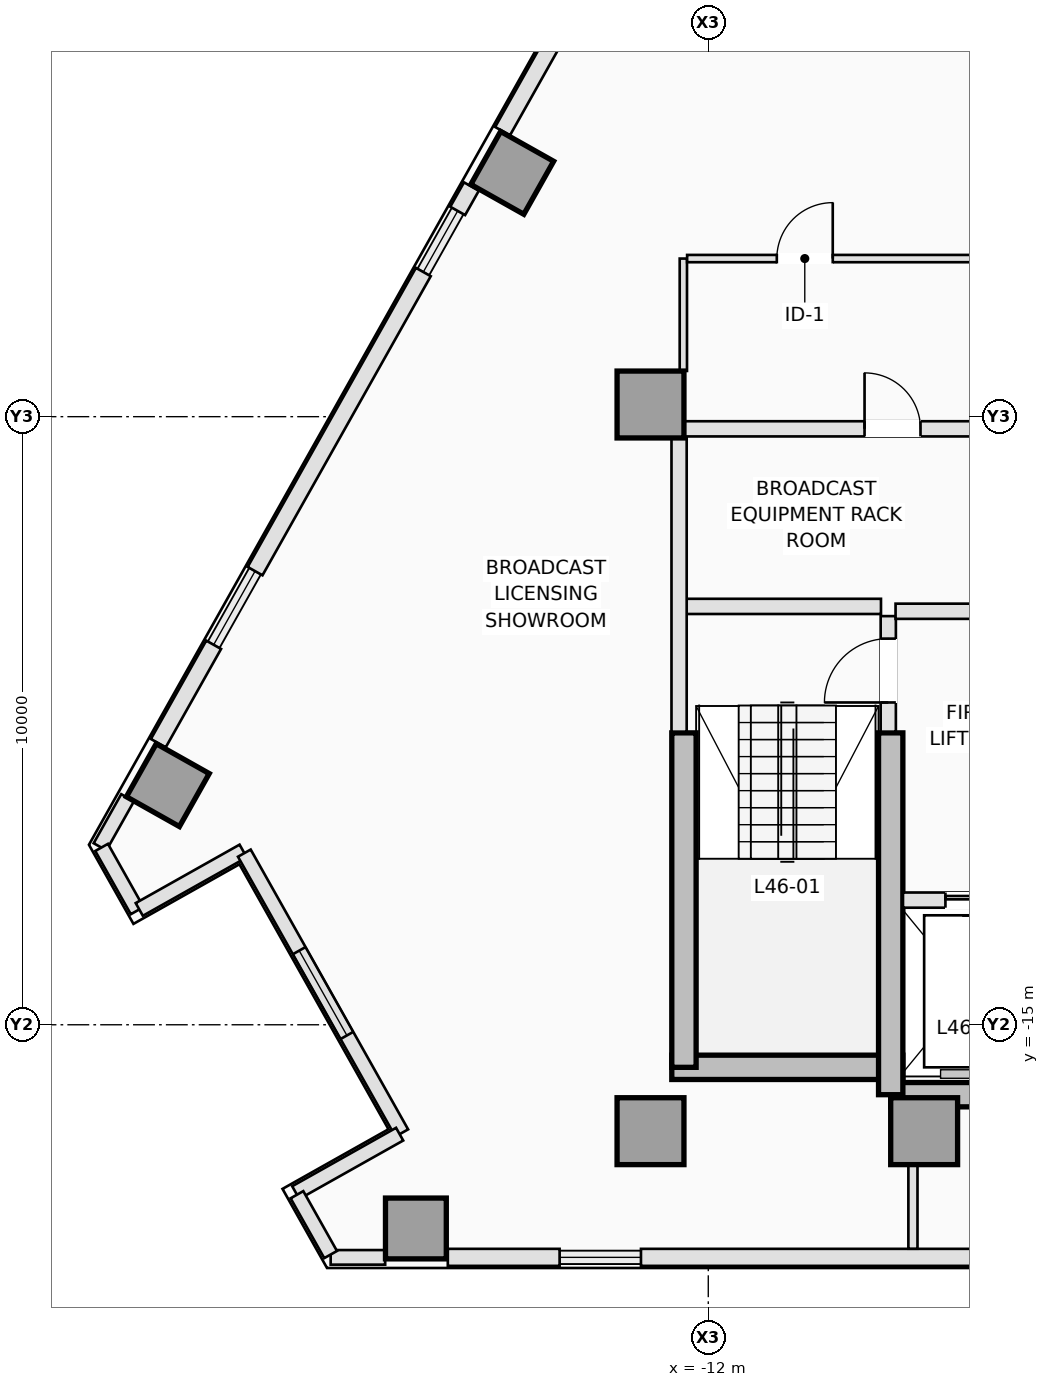
"""IFC4 building model, lengths in metres.
Left out: names, types, materials, properties, quantities, classifications, styles, units other than length and angle.
Written with IfcOpenShell. Run it as: python <this file> out.ifc"""

import sys

from ifc_helpers import new_model, si_unit, direction, frame, frame_2d, origin, origin_2d, place, context, subcontext, project, spatial, rectangle, extrude, element, fill, save


model = new_model("IFC4")
c1 = context("Model", 3, precision=1e-05, world=origin(), true_north=direction((0.0, 1.0)))
c2 = subcontext(c1, "Body", "Model", "MODEL_VIEW")
j1 = project(units=[si_unit("LENGTHUNIT", "METRE"), si_unit("PLANEANGLEUNIT", "RADIAN")], contexts=[c1])
p1 = place(None, origin())
s1 = spatial("IfcSite", under=j1, at=p1, CompositionType="ELEMENT")
p2 = place(p1, origin())
s2 = spatial("IfcBuilding", under=s1, at=p2, CompositionType="ELEMENT")
p3 = place(p2, frame((0.0, 0.0, 168.5)))
s3 = spatial("IfcBuildingStorey", under=s2, at=p3, CompositionType="ELEMENT", Elevation=168.5)
p4 = place(p3, frame((-12.6, -15.7, 0.0), z_axis=(0.0, 0.0, 1.0), x_axis=(1.0, 0.0, 0.0)))
e1 = element("IfcWall", 1, at=p4, inside=s3, PredefinedType="SHEAR", context=c2, shape_type="SweptSolid", body=[
    extrude(rectangle(XDim=3.8, YDim=0.4, at=frame_2d((1.9, 0.0))), origin(), (0.0, 0.0, 1.0), 3.5),
])
p5 = place(p3, frame((-9.0, -16.15, 0.0), z_axis=(0.0, 0.0, 1.0), x_axis=(1.0, 0.0, 0.0)))
e2 = element("IfcWall", 2, at=p5, inside=s3, PredefinedType="SHEAR", context=c2, shape_type="SweptSolid", body=[
    extrude(rectangle(XDim=5.25, YDim=0.4, at=frame_2d((2.625, 0.0))), origin(), (0.0, 0.0, 1.0), 3.5),
])
p6 = place(p3, frame((-12.4, -15.7, 0.0), z_axis=(0.0, 0.0, 1.0), x_axis=(0.0, 1.0, 0.0)))
e3 = element("IfcWall", 3, at=p6, inside=s3, PredefinedType="SHEAR", context=c2, shape_type="SweptSolid", body=[
    extrude(rectangle(XDim=5.5, YDim=0.4, at=frame_2d((2.75, 0.0))), origin(), (0.0, 0.0, 1.0), 3.5),
])
p7 = place(p3, frame((-9.0, -16.15, 0.0), z_axis=(0.0, 0.0, 1.0), x_axis=(0.0, 1.0, 0.0)))
e4 = element("IfcWall", 4, at=p7, inside=s3, PredefinedType="SHEAR", context=c2, shape_type="SweptSolid", body=[
    extrude(rectangle(XDim=5.95, YDim=0.4, at=frame_2d((2.975, 0.0))), origin(), (0.0, 0.0, 1.0), 3.5),
])
for number, where, z_axis, x_axis in (
    (5, (-12.95, -16.75, 0.0), (0.0, 0.0, 1.0), (1.0, 0.0, 0.0)),
    (6, (-8.45, -16.75, 0.0), (0.0, 0.0, 1.0), (1.0, 0.0, 0.0)),
    (7, (-12.95, -4.8, 0.0), (0.0, 0.0, 1.0), (1.0, 0.0, 0.0)),
):
    element("IfcColumn", number, at=place(p3, frame(where, z_axis=z_axis, x_axis=x_axis)), inside=s3, PredefinedType="COLUMN", context=c2, shape_type="SweptSolid", body=[
        extrude(rectangle(XDim=1.1, YDim=1.1, at=origin_2d()), origin(), (0.0, 0.0, 1.0), 3.5),
    ])
for number, where, z_axis, x_axis in (
    (8, (-16.808, -18.35, 0.0), (0.0, 0.0, 1.0), (0.0, 1.0, 0.0)),
    (9, (-15.224, -0.991, 0.0), (0.0, 0.0, 1.0), (-0.872, 0.49, 0.0)),
    (10, (-20.888, -11.06, 0.0), (0.0, 0.0, 1.0), (-0.872, 0.49, 0.0)),
):
    element("IfcColumn", number, at=place(p3, frame(where, z_axis=z_axis, x_axis=x_axis)), inside=s3, PredefinedType="COLUMN", context=c2, shape_type="SweptSolid", body=[
        extrude(rectangle(XDim=1.0, YDim=1.0, at=origin_2d()), origin(), (0.0, 0.0, 1.0), 3.5),
    ])
p8 = place(p3, frame((-17.313, -18.825, 0.0), z_axis=(0.0, 0.0, 1.0), x_axis=(-1.0, 0.0, 0.0)))
e11 = element("IfcWall", 11, at=p8, inside=s3, PredefinedType="STANDARD", context=c2, shape_type="SweptSolid", body=[
    extrude(rectangle(XDim=0.896, YDim=0.24, at=frame_2d((0.448, 0.0))), origin(), (0.0, 0.0, 1.0), 3.25),
])
p9 = place(p3, frame((-7.557, -18.825, 0.0), z_axis=(0.0, 0.0, 1.0), x_axis=(-1.0, 0.0, 0.0)))
e12 = element("IfcWall", 12, at=p9, inside=s3, PredefinedType="STANDARD", context=c2, shape_type="SweptSolid", body=[
    extrude(rectangle(XDim=5.55, YDim=0.28, at=frame_2d((2.775, 0.0))), origin(), (0.0, 0.0, 1.0), 3.25),
])
p10 = place(p3, frame((-14.445, -18.825, 0.0), z_axis=(0.0, 0.0, 1.0), x_axis=(-1.0, 0.0, 0.0)))
e13 = element("IfcWall", 13, at=p10, inside=s3, PredefinedType="STANDARD", context=c2, shape_type="SweptSolid", body=[
    extrude(rectangle(XDim=1.838, YDim=0.28, at=frame_2d((0.919, 0.0))), origin(), (0.0, 0.0, 1.0), 3.25),
])
p11 = place(p3, frame((-22.003, -12.073, 0.0), z_axis=(0.0, 0.0, 1.0), x_axis=(0.490248718924, 0.871582579905, 0.0)))
e14 = element("IfcWall", 14, at=p11, inside=s3, PredefinedType="STANDARD", context=c2, shape_type="SweptSolid", body=[
    extrude(rectangle(XDim=0.926, YDim=0.24, at=frame_2d((0.463, 0.0))), origin(), (0.0, 0.0, 1.0), 3.25),
])
p12 = place(p3, frame((-21.044, -10.369, 0.0), z_axis=(0.0, 0.0, 1.0), x_axis=(0.490248749158, 0.871582562899, 0.0)))
e15 = element("IfcWall", 15, at=p12, inside=s3, PredefinedType="STANDARD", context=c2, shape_type="SweptSolid", body=[
    extrude(rectangle(XDim=1.856, YDim=0.28, at=frame_2d((0.928, 0.0))), origin(), (0.0, 0.0, 1.0), 3.25),
])
p13 = place(p3, frame((-19.453, -7.54, 0.0), z_axis=(0.0, 0.0, 1.0), x_axis=(0.490238645956, 0.871588245682, 0.0)))
e16 = element("IfcWall", 16, at=p13, inside=s3, PredefinedType="STANDARD", context=c2, shape_type="SweptSolid", body=[
    extrude(rectangle(XDim=5.643, YDim=0.28, at=frame_2d((2.822, 0.0))), origin(), (0.0, 0.0, 1.0), 3.25),
])
p14 = place(p3, frame((-16.121, -1.616, 0.0), z_axis=(0.0, 0.0, 1.0), x_axis=(0.490009165718, 0.871717280724, 0.0)))
e17 = element("IfcWall", 17, at=p14, inside=s3, PredefinedType="STANDARD", context=c2, shape_type="SweptSolid", body=[
    extrude(rectangle(XDim=0.46, YDim=0.28, at=frame_2d((0.23, 0.0))), origin(), (0.0, 0.0, 1.0), 3.25),
])
p15 = place(p3, frame((-15.383, -0.305, 0.0), z_axis=(0.0, 0.0, 1.0), x_axis=(0.490232095789, 0.871591929895, 0.0)))
e18 = element("IfcWall", 18, at=p15, inside=s3, PredefinedType="STANDARD", context=c2, shape_type="SweptSolid", body=[
    extrude(rectangle(XDim=4.375, YDim=0.28, at=frame_2d((2.188, 0.0))), origin(), (0.0, 0.0, 1.0), 3.25),
])
p16 = place(p3, frame((-21.977, -12.083, 0.0), z_axis=(0.0, 0.0, 1.0), x_axis=(0.490154352582, -0.871635652463, 0.0)))
e19 = element("IfcWall", 19, at=p16, inside=s3, PredefinedType="STANDARD", context=c2, shape_type="SweptSolid", body=[
    extrude(rectangle(XDim=1.193, YDim=0.24, at=frame_2d((0.596, 0.0))), origin(), (0.0, 0.0, 1.0), 3.25),
])
p17 = place(p3, frame((-21.357, -13.104, 0.0), z_axis=(0.0, 0.0, 1.0), x_axis=(0.871595493845, 0.490225759328, 0.0)))
e20 = element("IfcWall", 20, at=p17, inside=s3, PredefinedType="STANDARD", context=c2, shape_type="SweptSolid", body=[
    extrude(rectangle(XDim=1.96, YDim=0.24, at=frame_2d((0.98, 0.0))), origin(), (0.0, 0.0, 1.0), 3.25),
])
p18 = place(p3, frame((-19.629, -12.177, 0.0), z_axis=(0.0, 0.0, 1.0), x_axis=(0.490276606961, -0.871566892824, 0.0)))
e21 = element("IfcWall", 21, at=p18, inside=s3, PredefinedType="STANDARD", context=c2, shape_type="SweptSolid", body=[
    extrude(rectangle(XDim=5.28, YDim=0.24, at=frame_2d((2.64, 0.0))), origin(), (0.0, 0.0, 1.0), 3.25),
])
p19 = place(p18, frame((1.84, 0.0, 0.9)))
e22 = element("IfcOpeningElement", 22, at=p19, cuts=e21, PredefinedType="OPENING", context=c2, shape_type="SweptSolid", body=[
    extrude(rectangle(XDim=1.6, YDim=2.1, at=frame_2d((0.8, 1.05))), frame((0.0, 0.13, 0.0), z_axis=(0.0, -1.0, 0.0), x_axis=(1.0, 0.0, 0.0)), (0.0, 0.0, 1.0), 0.26),
])
p20 = place(p3, frame((-17.076, -16.799, 0.0), z_axis=(0.0, 0.0, 1.0), x_axis=(-0.871565557139, -0.490278981406, 0.0)))
e23 = element("IfcWall", 23, at=p20, inside=s3, PredefinedType="STANDARD", context=c2, shape_type="SweptSolid", body=[
    extrude(rectangle(XDim=1.96, YDim=0.24, at=frame_2d((0.98, 0.0))), origin(), (0.0, 0.0, 1.0), 3.25),
])
p21 = place(p3, frame((-18.764, -17.795, 0.0), z_axis=(0.0, 0.0, 1.0), x_axis=(0.490353621339, -0.871523565969, 0.0)))
e24 = element("IfcWall", 24, at=p21, inside=s3, PredefinedType="STANDARD", context=c2, shape_type="SweptSolid", body=[
    extrude(rectangle(XDim=1.129, YDim=0.24, at=frame_2d((0.564, 0.0))), origin(), (0.0, 0.0, 1.0), 3.25),
])
p22 = place(p3, frame((-9.04, -10.18, 0.0), z_axis=(0.0, 0.0, 1.0), x_axis=(0.0, 1.0, 0.0)))
e25 = element("IfcWall", 25, at=p22, inside=s3, PredefinedType="PARTITIONING", context=c2, shape_type="SweptSolid", body=[
    extrude(rectangle(XDim=1.9, YDim=0.25, at=frame_2d((0.95, 0.0))), origin(), (0.0, 0.0, 1.0), 3.25),
])
p23 = place(p22, frame((0.48, 0.0, 0.0)))
e26 = element("IfcOpeningElement", 26, at=p23, cuts=e25, PredefinedType="OPENING", context=c2, shape_type="SweptSolid", body=[
    extrude(rectangle(XDim=1.05, YDim=2.15, at=frame_2d((0.525, 1.075))), frame((0.0, 0.135, 0.0), z_axis=(0.0, -1.0, 0.0), x_axis=(1.0, 0.0, 0.0)), (0.0, 0.0, 1.0), 0.27),
])
p24 = place(p3, frame((-12.38, -8.12, 0.0), z_axis=(0.0, 0.0, 1.0), x_axis=(1.0, 0.0, 0.0)))
e27 = element("IfcWall", 27, at=p24, inside=s3, PredefinedType="PARTITIONING", context=c2, shape_type="SweptSolid", body=[
    extrude(rectangle(XDim=3.22, YDim=0.25, at=frame_2d((1.61, 0.0))), origin(), (0.0, 0.0, 1.0), 3.25),
])
p25 = place(p3, frame((-12.48, -10.18, 0.0), z_axis=(0.0, 0.0, 1.0), x_axis=(0.0, 1.0, 0.0)))
e28 = element("IfcWall", 28, at=p25, inside=s3, PredefinedType="PARTITIONING", context=c2, shape_type="SweptSolid", body=[
    extrude(rectangle(XDim=4.828, YDim=0.25, at=frame_2d((2.414, 0.0))), origin(), (0.0, 0.0, 1.0), 3.25),
])
p26 = place(p3, frame((-8.798, -12.95, 0.0), z_axis=(0.0, 0.0, 1.0), x_axis=(1.0, 0.0, 0.0)))
e29 = element("IfcWall", 29, at=p26, inside=s3, PredefinedType="PARTITIONING", context=c2, shape_type="SweptSolid", body=[
    extrude(rectangle(XDim=5.118, YDim=0.25, at=frame_2d((2.559, 0.0))), origin(), (0.0, 0.0, 1.0), 3.25),
])
p27 = place(p26, frame((0.698, 0.0, 0.0)))
e30 = element("IfcOpeningElement", 30, at=p27, cuts=e29, PredefinedType="OPENING", context=c2, shape_type="SweptSolid", body=[
    extrude(rectangle(XDim=1.1, YDim=2.15, at=frame_2d((0.55, 1.075))), frame((0.0, 0.135, 0.0), z_axis=(0.0, -1.0, 0.0), x_axis=(1.0, 0.0, 0.0)), (0.0, 0.0, 1.0), 0.27),
])
p28 = place(p26, frame((2.598, 0.0, 0.0)))
e31 = element("IfcOpeningElement", 31, at=p28, cuts=e29, PredefinedType="OPENING", context=c2, shape_type="SweptSolid", body=[
    extrude(rectangle(XDim=0.88, YDim=2.1, at=frame_2d((0.44, 1.05))), frame((0.0, 0.135, 0.0), z_axis=(0.0, -1.0, 0.0), x_axis=(1.0, 0.0, 0.0)), (0.0, 0.0, 1.0), 0.27),
])
p29 = place(p26, frame((3.998, 0.0, 0.0)))
e32 = element("IfcOpeningElement", 32, at=p29, cuts=e29, PredefinedType="OPENING", context=c2, shape_type="SweptSolid", body=[
    extrude(rectangle(XDim=0.88, YDim=2.1, at=frame_2d((0.44, 1.05))), frame((0.0, 0.135, 0.0), z_axis=(0.0, -1.0, 0.0), x_axis=(1.0, 0.0, 0.0)), (0.0, 0.0, 1.0), 0.27),
])
p30 = place(p3, frame((-8.92, -8.2, 0.0), z_axis=(0.0, 0.0, 1.0), x_axis=(1.0, 0.0, 0.0)))
e33 = element("IfcWall", 33, at=p30, inside=s3, PredefinedType="PARTITIONING", context=c2, shape_type="SweptSolid", body=[
    extrude(rectangle(XDim=5.24, YDim=0.25, at=frame_2d((2.62, 0.0))), origin(), (0.0, 0.0, 1.0), 3.25),
])
p31 = place(p3, frame((-12.398, -5.2, 0.0), z_axis=(0.0, 0.0, 1.0), x_axis=(1.0, 0.0, 0.0)))
e34 = element("IfcWall", 34, at=p31, inside=s3, PredefinedType="PARTITIONING", context=c2, shape_type="SweptSolid", body=[
    extrude(rectangle(XDim=8.096, YDim=0.25, at=frame_2d((4.048, 0.0))), origin(), (0.0, 0.0, 1.0), 3.25),
])
p32 = place(p31, frame((2.968, 0.0, 0.0)))
e35 = element("IfcOpeningElement", 35, at=p32, cuts=e34, PredefinedType="OPENING", context=c2, shape_type="SweptSolid", body=[
    extrude(rectangle(XDim=0.92, YDim=2.12, at=frame_2d((0.46, 1.06))), frame((0.0, 0.135, 0.0), z_axis=(0.0, -1.0, 0.0), x_axis=(1.0, 0.0, 0.0)), (0.0, 0.0, 1.0), 0.27),
])
p33 = place(p31, frame((6.068, 0.0, 0.0)))
e36 = element("IfcOpeningElement", 36, at=p33, cuts=e34, PredefinedType="OPENING", context=c2, shape_type="SweptSolid", body=[
    extrude(rectangle(XDim=0.92, YDim=2.12, at=frame_2d((0.46, 1.06))), frame((0.0, 0.135, 0.0), z_axis=(0.0, -1.0, 0.0), x_axis=(1.0, 0.0, 0.0)), (0.0, 0.0, 1.0), 0.27),
])
p34 = place(p3, frame((-12.41, -4.248, 0.0), z_axis=(0.0, 0.0, 1.0), x_axis=(0.0, 1.0, 0.0)))
e37 = element("IfcWall", 37, at=p34, inside=s3, PredefinedType="PARTITIONING", context=c2, shape_type="SweptSolid", body=[
    extrude(rectangle(XDim=1.848, YDim=0.12, at=frame_2d((0.924, 0.0))), origin(), (0.0, 0.0, 1.0), 3.25),
])
p35 = place(p3, frame((-12.348, -2.4, 0.0), z_axis=(0.0, 0.0, 1.0), x_axis=(1.0, 0.0, 0.0)))
e38 = element("IfcWall", 38, at=p35, inside=s3, PredefinedType="PARTITIONING", context=c2, shape_type="SweptSolid", body=[
    extrude(rectangle(XDim=5.836, YDim=0.12, at=frame_2d((2.918, 0.0))), origin(), (0.0, 0.0, 1.0), 3.25),
])
p36 = place(p35, frame((1.475, 0.0, 0.0)))
e39 = element("IfcOpeningElement", 39, at=p36, cuts=e38, PredefinedType="OPENING", context=c2, shape_type="SweptSolid", body=[
    extrude(rectangle(XDim=0.92, YDim=2.12, at=frame_2d((0.46, 1.06))), frame((0.0, 0.07, 0.0), z_axis=(0.0, -1.0, 0.0), x_axis=(1.0, 0.0, 0.0)), (0.0, 0.0, 1.0), 0.14),
])
p37 = place(p3, frame((-8.635, -17.302, 0.0), z_axis=(0.0, 0.0, 1.0), x_axis=(0.0, -1.0, 0.0)))
e40 = element("IfcWall", 40, at=p37, inside=s3, PredefinedType="PARTITIONING", context=c2, shape_type="SweptSolid", body=[
    extrude(rectangle(XDim=1.381, YDim=0.15, at=frame_2d((0.69, 0.0))), origin(), (0.0, 0.0, 1.0), 3.25),
])
p38 = place(p19, origin())
e41 = element("IfcWindow", 41, at=p38, inside=s3, PartitioningType="SINGLE_PANEL", PredefinedType="WINDOW", context=c2, shape_type="SweptSolid", body=[
    extrude(rectangle(XDim=1.6, YDim=2.1, at=frame_2d((0.8, 1.05))), frame((0.0, 0.03, 0.0), z_axis=(0.0, -1.0, 0.0), x_axis=(1.0, 0.0, 0.0)), (0.0, 0.0, 1.0), 0.06),
])
fill(e22, e41)
p39 = place(p27, origin())
e42 = element("IfcDoor", 42, at=p39, inside=s3, OperationType="SLIDING_TO_LEFT", PredefinedType="DOOR", context=c2, shape_type="SweptSolid", body=[
    extrude(rectangle(XDim=1.1, YDim=2.15, at=frame_2d((0.55, 1.075))), frame((0.0, 0.025, 0.0), z_axis=(0.0, -1.0, 0.0), x_axis=(1.0, 0.0, 0.0)), (0.0, 0.0, 1.0), 0.05),
])
fill(e30, e42)
p40 = place(p23, origin())
e43 = element("IfcDoor", 43, at=p40, inside=s3, OperationType="SINGLE_SWING_LEFT", PredefinedType="DOOR", context=c2, shape_type="SweptSolid", body=[
    extrude(rectangle(XDim=1.05, YDim=2.15, at=frame_2d((0.525, 1.075))), frame((0.0, 0.025, 0.0), z_axis=(0.0, -1.0, 0.0), x_axis=(1.0, 0.0, 0.0)), (0.0, 0.0, 1.0), 0.05),
])
fill(e26, e43)
p41 = place(p32, origin())
e44 = element("IfcDoor", 44, at=p41, inside=s3, OperationType="SINGLE_SWING_LEFT", PredefinedType="DOOR", context=c2, shape_type="SweptSolid", body=[
    extrude(rectangle(XDim=0.92, YDim=2.12, at=frame_2d((0.46, 1.06))), frame((0.0, 0.025, 0.0), z_axis=(0.0, -1.0, 0.0), x_axis=(1.0, 0.0, 0.0)), (0.0, 0.0, 1.0), 0.05),
])
fill(e35, e44)
p42 = place(p36, origin())
e45 = element("IfcDoor", 45, at=p42, inside=s3, OperationType="SINGLE_SWING_RIGHT", PredefinedType="DOOR", context=c2, shape_type="SweptSolid", body=[
    extrude(rectangle(XDim=0.92, YDim=2.12, at=frame_2d((0.46, 1.06))), frame((0.0, 0.025, 0.0), z_axis=(0.0, -1.0, 0.0), x_axis=(1.0, 0.0, 0.0)), (0.0, 0.0, 1.0), 0.05),
])
fill(e39, e45)
save(model, sys.argv[1])
